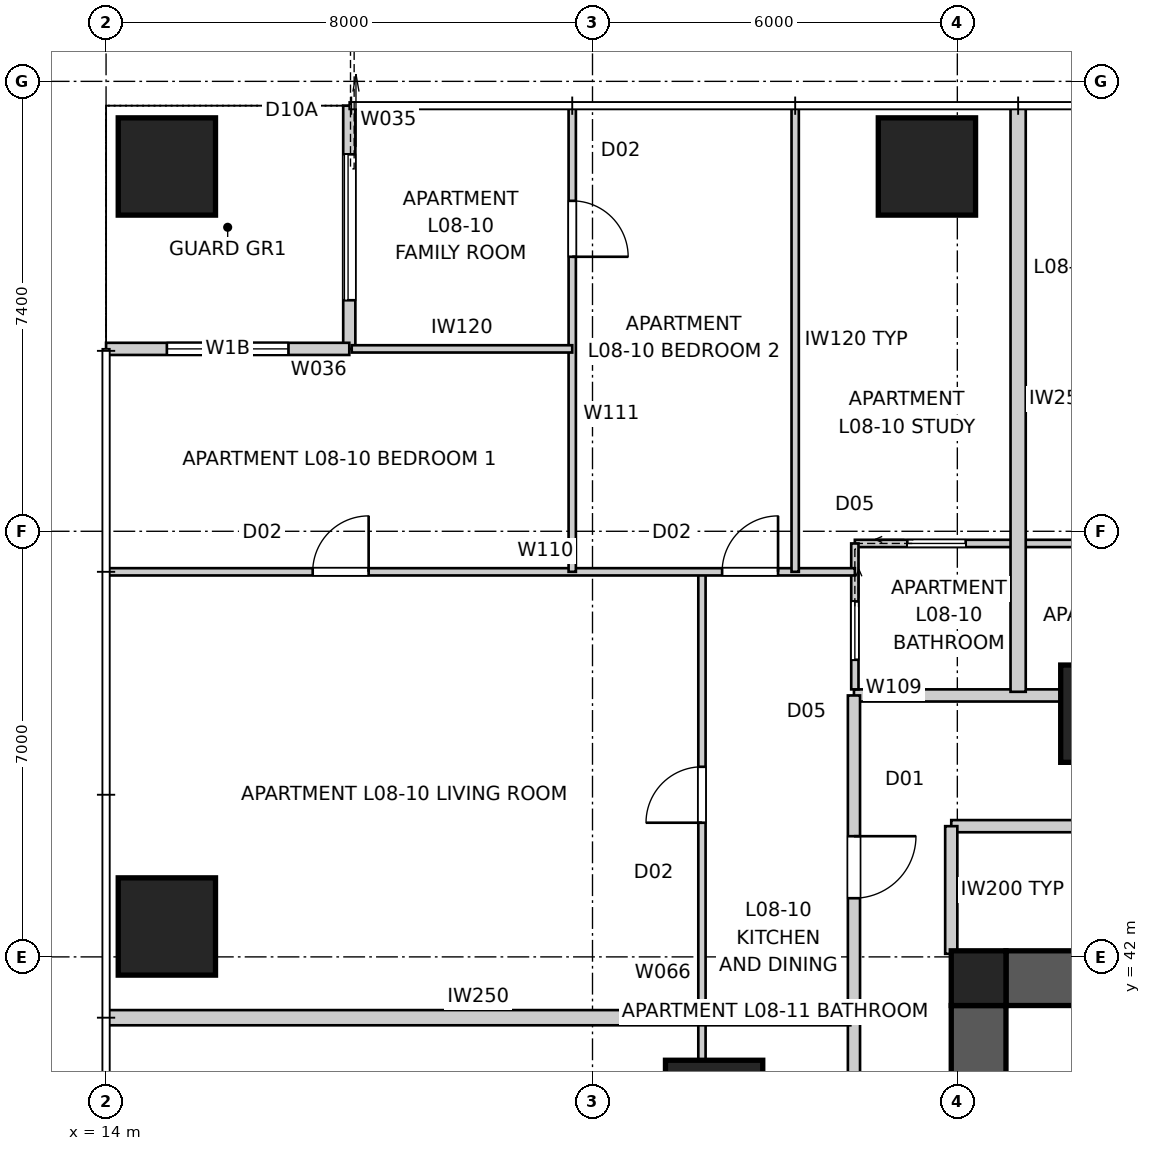
"""IFC4 building model, lengths in metres.
Left out: names, types, materials, properties, quantities, classifications, styles, units other than length and angle.
Written with IfcOpenShell. Run it as: python <this file> out.ifc"""

import sys

from ifc_helpers import new_model, si_unit, direction, frame, frame_2d, origin, origin_2d, place, context, subcontext, project, spatial, polyline, rectangle, outline, extrude, element, fill, save


model = new_model("IFC4")
c1 = context("Model", 3, precision=1e-05, world=origin(), true_north=direction((0.0, 1.0)))
c2 = subcontext(c1, "Body", "Model", "MODEL_VIEW")
j1 = project(units=[si_unit("LENGTHUNIT", "METRE"), si_unit("PLANEANGLEUNIT", "RADIAN")], contexts=[c1])
p1 = place(None, origin())
s1 = spatial("IfcSite", under=j1, at=p1, CompositionType="ELEMENT")
p2 = place(p1, origin())
s2 = spatial("IfcBuilding", under=s1, at=p2, CompositionType="ELEMENT")
p3 = place(p2, frame((0.0, 0.0, 32.0)))
s3 = spatial("IfcBuildingStorey", under=s2, at=p3, CompositionType="ELEMENT", Elevation=32.0)
p4 = place(p3, frame((28.8, 41.65, 0.0), z_axis=(0.0, 0.0, 1.0), x_axis=(1.0, 0.0, 0.0)))
e1 = element("IfcWall", 1, at=p4, inside=s3, PredefinedType="SHEAR", context=c2, shape_type="SweptSolid", body=[
    extrude(outline(polyline([(0.0, -0.45), (22.4, -0.45), (22.4, -0.025), (22.85, -0.025), (22.85, 0.025), (22.4, 0.025), (22.4, 0.45), (0.0, 0.45), (0.0, 0.025), (-0.45, 0.025), (-0.45, -0.025), (0.0, -0.025), (0.0, -0.45)])), origin(), (0.0, 0.0, 1.0), 3.4),
])
p5 = place(p3, frame((28.35, 41.2, 0.0), z_axis=(0.0, 0.0, 1.0), x_axis=(0.0, -1.0, 0.0)))
e2 = element("IfcWall", 2, at=p5, inside=s3, PredefinedType="SHEAR", context=c2, shape_type="SweptSolid", body=[
    extrude(outline(polyline([(0.0, -0.45), (22.4, -0.45), (22.4, -0.025), (22.85, -0.025), (22.85, 0.025), (22.4, 0.025), (22.4, 0.45), (0.0, 0.45), (0.0, 0.025), (-0.45, 0.025), (-0.45, -0.025), (0.0, -0.025), (0.0, -0.45)])), origin(), (0.0, 0.0, 1.0), 3.4),
])
p6 = place(p5, frame((11.14, 0.0, 0.0)))
e3 = element("IfcOpeningElement", 3, at=p6, cuts=e2, PredefinedType="OPENING", context=c2, shape_type="SweptSolid", body=[
    extrude(rectangle(XDim=1.02, YDim=2.4, at=frame_2d((0.51, 1.2))), frame((0.0, 0.46, 0.0), z_axis=(0.0, -1.0, 0.0), x_axis=(1.0, 0.0, 0.0)), (0.0, 0.0, 1.0), 0.92),
])
p7 = place(p3, frame((28.35, 41.65, 0.0), z_axis=(0.0, 0.0, 1.0), x_axis=(1.0, 0.0, 0.0)))
e4 = element("IfcColumn", 4, at=p7, inside=s3, PredefinedType="COLUMN", context=c2, shape_type="SweptSolid", body=[
    extrude(rectangle(XDim=0.9, YDim=0.9, at=origin_2d()), origin(), (0.0, 0.0, 1.0), 3.4),
])
for number, where, z_axis, x_axis in (
    (5, (27.5, 55.0, 0.0), (0.0, 0.0, 1.0), (1.0, 0.0, 0.0)),
    (6, (15.0, 55.0, 0.0), (0.0, 0.0, 1.0), (1.0, 0.0, 0.0)),
    (7, (15.0, 42.5, 0.0), (0.0, 0.0, 1.0), (1.0, 0.0, 0.0)),
    (8, (30.5, 46.0, 0.0), (0.0, 0.0, 1.0), (1.0, 0.0, 0.0)),
    (9, (24.0, 39.5, 0.0), (0.0, 0.0, 1.0), (1.0, 0.0, 0.0)),
):
    element("IfcColumn", number, at=place(p3, frame(where, z_axis=z_axis, x_axis=x_axis)), inside=s3, PredefinedType="COLUMN", context=c2, shape_type="SweptSolid", body=[
        extrude(rectangle(XDim=1.6, YDim=1.6, at=origin_2d()), origin(), (0.0, 0.0, 1.0), 3.4),
    ])
p8 = place(p3, frame((18.0, 56.0, 0.0), z_axis=(0.0, 0.0, 1.0), x_axis=(0.0, -1.0, 0.0)))
e10 = element("IfcWall", 10, at=p8, inside=s3, PredefinedType="SOLIDWALL", context=c2, shape_type="SweptSolid", body=[
    extrude(rectangle(XDim=4.0, YDim=0.2, at=frame_2d((2.0, 0.0))), origin(), (0.0, 0.0, 1.0), 3.25),
])
p9 = place(p8, frame((0.8, 0.0, 0.0)))
e11 = element("IfcOpeningElement", 11, at=p9, cuts=e10, PredefinedType="OPENING", context=c2, shape_type="SweptSolid", body=[
    extrude(rectangle(XDim=2.4, YDim=2.1, at=frame_2d((1.2, 1.05))), frame((0.0, 0.11, 0.0), z_axis=(0.0, -1.0, 0.0), x_axis=(1.0, 0.0, 0.0)), (0.0, 0.0, 1.0), 0.22),
])
p10 = place(p3, frame((18.0, 52.0, 0.0), z_axis=(0.0, 0.0, 1.0), x_axis=(-1.0, 0.0, 0.0)))
e12 = element("IfcWall", 12, at=p10, inside=s3, PredefinedType="SOLIDWALL", context=c2, shape_type="SweptSolid", body=[
    extrude(rectangle(XDim=4.0, YDim=0.2, at=frame_2d((2.0, 0.0))), origin(), (0.0, 0.0, 1.0), 3.25),
])
p11 = place(p10, frame((1.0, 0.0, 0.45)))
e13 = element("IfcOpeningElement", 13, at=p11, cuts=e12, PredefinedType="OPENING", context=c2, shape_type="SweptSolid", body=[
    extrude(rectangle(XDim=2.0, YDim=1.8, at=frame_2d((1.0, 0.9))), frame((0.0, 0.11, 0.0), z_axis=(0.0, -1.0, 0.0), x_axis=(1.0, 0.0, 0.0)), (0.0, 0.0, 1.0), 0.22),
])
p12 = place(p3, frame((30.758, 46.3, 0.0), z_axis=(0.0, 0.0, 1.0), x_axis=(-1.0, 0.0, 0.0)))
e14 = element("IfcWall", 14, at=p12, inside=s3, PredefinedType="PARTITIONING", context=c2, shape_type="SweptSolid", body=[
    extrude(rectangle(XDim=4.458, YDim=0.2, at=frame_2d((2.229, 0.0))), origin(), (0.0, 0.0, 1.0), 3.25),
])
p13 = place(p3, frame((26.3, 46.3, 0.0), z_axis=(0.0, 0.0, 1.0), x_axis=(0.0, -1.0, 0.0)))
e15 = element("IfcWall", 15, at=p13, inside=s3, PredefinedType="PARTITIONING", context=c2, shape_type="SweptSolid", body=[
    extrude(rectangle(XDim=32.6, YDim=0.2, at=frame_2d((16.3, 0.0))), origin(), (0.0, 0.0, 1.0), 3.25),
])
p14 = place(p13, frame((2.315, 0.0, 0.0)))
e16 = element("IfcOpeningElement", 16, at=p14, cuts=e15, PredefinedType="OPENING", context=c2, shape_type="SweptSolid", body=[
    extrude(rectangle(XDim=1.02, YDim=2.34, at=frame_2d((0.51, 1.17))), frame((0.0, 0.11, 0.0), z_axis=(0.0, -1.0, 0.0), x_axis=(1.0, 0.0, 0.0)), (0.0, 0.0, 1.0), 0.22),
])
p15 = place(p13, frame((10.624, 0.0, 0.0)))
e17 = element("IfcOpeningElement", 17, at=p15, cuts=e15, PredefinedType="OPENING", context=c2, shape_type="SweptSolid", body=[
    extrude(rectangle(XDim=1.02, YDim=2.34, at=frame_2d((0.51, 1.17))), frame((0.0, 0.11, 0.0), z_axis=(0.0, -1.0, 0.0), x_axis=(1.0, 0.0, 0.0)), (0.0, 0.0, 1.0), 0.22),
])
p16 = place(p13, frame((17.848, 0.0, 0.0)))
e18 = element("IfcOpeningElement", 18, at=p16, cuts=e15, PredefinedType="OPENING", context=c2, shape_type="SweptSolid", body=[
    extrude(rectangle(XDim=1.02, YDim=2.34, at=frame_2d((0.51, 1.17))), frame((0.0, 0.11, 0.0), z_axis=(0.0, -1.0, 0.0), x_axis=(1.0, 0.0, 0.0)), (0.0, 0.0, 1.0), 0.22),
])
p17 = place(p13, frame((30.516, 0.0, 0.0)))
e19 = element("IfcOpeningElement", 19, at=p17, cuts=e15, PredefinedType="OPENING", context=c2, shape_type="SweptSolid", body=[
    extrude(rectangle(XDim=1.02, YDim=2.34, at=frame_2d((0.51, 1.17))), frame((0.0, 0.11, 0.0), z_axis=(0.0, -1.0, 0.0), x_axis=(1.0, 0.0, 0.0)), (0.0, 0.0, 1.0), 0.22),
])
p18 = place(p3, frame((29.0, 56.0, 0.0), z_axis=(0.0, 0.0, 1.0), x_axis=(0.0, -1.0, 0.0)))
e20 = element("IfcWall", 20, at=p18, inside=s3, PredefinedType="PARTITIONING", context=c2, shape_type="SweptSolid", body=[
    extrude(rectangle(XDim=9.64, YDim=0.25, at=frame_2d((4.82, 0.0))), origin(), (0.0, 0.0, 1.0), 3.25),
])
p19 = place(p3, frame((14.0, 41.0, 0.0), z_axis=(0.0, 0.0, 1.0), x_axis=(1.0, 0.0, 0.0)))
e21 = element("IfcWall", 21, at=p19, inside=s3, PredefinedType="PARTITIONING", context=c2, shape_type="SweptSolid", body=[
    extrude(rectangle(XDim=12.24, YDim=0.25, at=frame_2d((6.12, 0.0))), origin(), (0.0, 0.0, 1.0), 3.25),
])
p20 = place(p3, frame((52.1, 44.15, 0.0), z_axis=(0.0, 0.0, 1.0), x_axis=(-1.0, 0.0, 0.0)))
e22 = element("IfcWall", 22, at=p20, inside=s3, PredefinedType="PARTITIONING", context=c2, shape_type="SweptSolid", body=[
    extrude(rectangle(XDim=24.2, YDim=0.2, at=frame_2d((12.1, 0.0))), origin(), (0.0, 0.0, 1.0), 3.25),
])
p21 = place(p20, frame((10.743, 0.0, 0.0)))
e23 = element("IfcOpeningElement", 23, at=p21, cuts=e22, PredefinedType="OPENING", context=c2, shape_type="SweptSolid", body=[
    extrude(rectangle(XDim=1.02, YDim=2.1, at=frame_2d((0.51, 1.05))), frame((0.0, 0.11, 0.0), z_axis=(0.0, -1.0, 0.0), x_axis=(1.0, 0.0, 0.0)), (0.0, 0.0, 1.0), 0.22),
])
p22 = place(p20, frame((19.636, 0.0, 0.0)))
e24 = element("IfcOpeningElement", 24, at=p22, cuts=e22, PredefinedType="OPENING", context=c2, shape_type="SweptSolid", body=[
    extrude(rectangle(XDim=1.02, YDim=2.1, at=frame_2d((0.51, 1.05))), frame((0.0, 0.11, 0.0), z_axis=(0.0, -1.0, 0.0), x_axis=(1.0, 0.0, 0.0)), (0.0, 0.0, 1.0), 0.22),
])
p23 = place(p20, frame((3.447, 0.0, 0.0)))
e25 = element("IfcOpeningElement", 25, at=p23, cuts=e22, PredefinedType="OPENING", context=c2, shape_type="SweptSolid", body=[
    extrude(rectangle(XDim=1.02, YDim=2.1, at=frame_2d((0.51, 1.05))), frame((0.0, 0.11, 0.0), z_axis=(0.0, -1.0, 0.0), x_axis=(1.0, 0.0, 0.0)), (0.0, 0.0, 1.0), 0.22),
])
p24 = place(p3, frame((27.9, 44.15, 0.0), z_axis=(0.0, 0.0, 1.0), x_axis=(0.0, -1.0, 0.0)))
e26 = element("IfcWall", 26, at=p24, inside=s3, PredefinedType="PARTITIONING", context=c2, shape_type="SweptSolid", body=[
    extrude(rectangle(XDim=2.1, YDim=0.2, at=frame_2d((1.05, 0.0))), origin(), (0.0, 0.0, 1.0), 3.25),
])
p25 = place(p3, frame((23.8, 11.2, 0.0), z_axis=(0.0, 0.0, 1.0), x_axis=(0.0, 1.0, 0.0)))
e27 = element("IfcWall", 27, at=p25, inside=s3, PredefinedType="PARTITIONING", context=c2, shape_type="SweptSolid", body=[
    extrude(rectangle(XDim=37.133, YDim=0.12, at=frame_2d((18.567, 0.0))), origin(), (0.0, 0.0, 1.0), 2.55),
])
p26 = place(p25, frame((33.007, 0.0, 0.0)))
e28 = element("IfcOpeningElement", 28, at=p26, cuts=e27, PredefinedType="OPENING", context=c2, shape_type="SweptSolid", body=[
    extrude(rectangle(XDim=0.92, YDim=2.34, at=frame_2d((0.46, 1.17))), frame((0.0, 0.07, 0.0), z_axis=(0.0, -1.0, 0.0), x_axis=(1.0, 0.0, 0.0)), (0.0, 0.0, 1.0), 0.14),
])
p27 = place(p25, frame((23.84, 0.0, 0.0)))
e29 = element("IfcOpeningElement", 29, at=p27, cuts=e27, PredefinedType="OPENING", context=c2, shape_type="SweptSolid", body=[
    extrude(rectangle(XDim=0.92, YDim=2.34, at=frame_2d((0.46, 1.17))), frame((0.0, 0.07, 0.0), z_axis=(0.0, -1.0, 0.0), x_axis=(1.0, 0.0, 0.0)), (0.0, 0.0, 1.0), 0.14),
])
p28 = place(p25, frame((16.482, 0.0, 0.0)))
e30 = element("IfcOpeningElement", 30, at=p28, cuts=e27, PredefinedType="OPENING", context=c2, shape_type="SweptSolid", body=[
    extrude(rectangle(XDim=0.92, YDim=2.34, at=frame_2d((0.46, 1.17))), frame((0.0, 0.07, 0.0), z_axis=(0.0, -1.0, 0.0), x_axis=(1.0, 0.0, 0.0)), (0.0, 0.0, 1.0), 0.14),
])
p29 = place(p25, frame((1.632, 0.0, 0.0)))
e31 = element("IfcOpeningElement", 31, at=p29, cuts=e27, PredefinedType="OPENING", context=c2, shape_type="SweptSolid", body=[
    extrude(rectangle(XDim=0.92, YDim=2.34, at=frame_2d((0.46, 1.17))), frame((0.0, 0.07, 0.0), z_axis=(0.0, -1.0, 0.0), x_axis=(1.0, 0.0, 0.0)), (0.0, 0.0, 1.0), 0.14),
])
p30 = place(p25, frame((19.704, 0.0, 0.0)))
e32 = element("IfcOpeningElement", 32, at=p30, cuts=e27, PredefinedType="OPENING", context=c2, shape_type="SweptSolid", body=[
    extrude(rectangle(XDim=0.96, YDim=2.1, at=frame_2d((0.48, 1.05))), frame((0.0, 0.07, 0.0), z_axis=(0.0, -1.0, 0.0), x_axis=(1.0, 0.0, 0.0)), (0.0, 0.0, 1.0), 0.14),
])
p31 = place(p25, frame((10.128, 0.0, 0.0)))
e33 = element("IfcOpeningElement", 33, at=p31, cuts=e27, PredefinedType="OPENING", context=c2, shape_type="SweptSolid", body=[
    extrude(rectangle(XDim=0.96, YDim=2.1, at=frame_2d((0.48, 1.05))), frame((0.0, 0.07, 0.0), z_axis=(0.0, -1.0, 0.0), x_axis=(1.0, 0.0, 0.0)), (0.0, 0.0, 1.0), 0.14),
])
p32 = place(p3, frame((26.315, 48.8, 0.0), z_axis=(0.0, 0.0, 1.0), x_axis=(1.0, 0.0, 0.0)))
e34 = element("IfcWall", 34, at=p32, inside=s3, PredefinedType="PARTITIONING", context=c2, shape_type="SweptSolid", body=[
    extrude(rectangle(XDim=27.41, YDim=0.12, at=frame_2d((13.705, 0.0))), origin(), (0.0, 0.0, 1.0), 3.25),
])
p33 = place(p32, frame((18.725, 0.0, 0.0)))
e35 = element("IfcOpeningElement", 35, at=p33, cuts=e34, PredefinedType="OPENING", context=c2, shape_type="SweptSolid", body=[
    extrude(rectangle(XDim=0.92, YDim=2.34, at=frame_2d((0.46, 1.17))), frame((0.0, 0.07, 0.0), z_axis=(0.0, -1.0, 0.0), x_axis=(1.0, 0.0, 0.0)), (0.0, 0.0, 1.0), 0.14),
])
p34 = place(p32, frame((22.367, 0.0, 0.0)))
e36 = element("IfcOpeningElement", 36, at=p34, cuts=e34, PredefinedType="OPENING", context=c2, shape_type="SweptSolid", body=[
    extrude(rectangle(XDim=0.92, YDim=2.34, at=frame_2d((0.46, 1.17))), frame((0.0, 0.07, 0.0), z_axis=(0.0, -1.0, 0.0), x_axis=(1.0, 0.0, 0.0)), (0.0, 0.0, 1.0), 0.14),
])
p35 = place(p32, frame((15.903, 0.0, 0.0)))
e37 = element("IfcOpeningElement", 37, at=p35, cuts=e34, PredefinedType="OPENING", context=c2, shape_type="SweptSolid", body=[
    extrude(rectangle(XDim=0.92, YDim=2.34, at=frame_2d((0.46, 1.17))), frame((0.0, 0.07, 0.0), z_axis=(0.0, -1.0, 0.0), x_axis=(1.0, 0.0, 0.0)), (0.0, 0.0, 1.0), 0.14),
])
p36 = place(p32, frame((25.567, 0.0, 0.0)))
e38 = element("IfcOpeningElement", 38, at=p36, cuts=e34, PredefinedType="OPENING", context=c2, shape_type="SweptSolid", body=[
    extrude(rectangle(XDim=0.96, YDim=2.1, at=frame_2d((0.48, 1.05))), frame((0.0, 0.07, 0.0), z_axis=(0.0, -1.0, 0.0), x_axis=(1.0, 0.0, 0.0)), (0.0, 0.0, 1.0), 0.14),
])
p37 = place(p32, frame((0.863, 0.0, 0.0)))
e39 = element("IfcOpeningElement", 39, at=p37, cuts=e34, PredefinedType="OPENING", context=c2, shape_type="SweptSolid", body=[
    extrude(rectangle(XDim=0.96, YDim=2.1, at=frame_2d((0.48, 1.05))), frame((0.0, 0.07, 0.0), z_axis=(0.0, -1.0, 0.0), x_axis=(1.0, 0.0, 0.0)), (0.0, 0.0, 1.0), 0.14),
])
p38 = place(p32, frame((7.503, 0.0, 0.0)))
e40 = element("IfcOpeningElement", 40, at=p38, cuts=e34, PredefinedType="OPENING", context=c2, shape_type="SweptSolid", body=[
    extrude(rectangle(XDim=0.96, YDim=2.1, at=frame_2d((0.48, 1.05))), frame((0.0, 0.07, 0.0), z_axis=(0.0, -1.0, 0.0), x_axis=(1.0, 0.0, 0.0)), (0.0, 0.0, 1.0), 0.14),
])
p39 = place(p3, frame((26.315, 48.8, 0.0), z_axis=(0.0, 0.0, 1.0), x_axis=(0.0, -1.0, 0.0)))
e41 = element("IfcWall", 41, at=p39, inside=s3, PredefinedType="PARTITIONING", context=c2, shape_type="SweptSolid", body=[
    extrude(rectangle(XDim=2.4, YDim=0.12, at=frame_2d((1.2, 0.0))), origin(), (0.0, 0.0, 1.0), 3.25),
])
p40 = place(p39, frame((0.953, 0.0, 0.0)))
e42 = element("IfcOpeningElement", 42, at=p40, cuts=e41, PredefinedType="OPENING", context=c2, shape_type="SweptSolid", body=[
    extrude(rectangle(XDim=0.96, YDim=2.1, at=frame_2d((0.48, 1.05))), frame((0.0, 0.07, 0.0), z_axis=(0.0, -1.0, 0.0), x_axis=(1.0, 0.0, 0.0)), (0.0, 0.0, 1.0), 0.14),
])
p41 = place(p3, frame((14.04, 48.333, 0.0), z_axis=(0.0, 0.0, 1.0), x_axis=(1.0, 0.0, 0.0)))
e43 = element("IfcWall", 43, at=p41, inside=s3, PredefinedType="PARTITIONING", context=c2, shape_type="SweptSolid", body=[
    extrude(rectangle(XDim=12.275, YDim=0.12, at=frame_2d((6.137, 0.0))), origin(), (0.0, 0.0, 1.0), 3.25),
])
p42 = place(p41, frame((10.092, 0.0, 0.0)))
e44 = element("IfcOpeningElement", 44, at=p42, cuts=e43, PredefinedType="OPENING", context=c2, shape_type="SweptSolid", body=[
    extrude(rectangle(XDim=0.92, YDim=2.34, at=frame_2d((0.46, 1.17))), frame((0.0, 0.07, 0.0), z_axis=(0.0, -1.0, 0.0), x_axis=(1.0, 0.0, 0.0)), (0.0, 0.0, 1.0), 0.14),
])
p43 = place(p41, frame((3.358, 0.0, 0.0)))
e45 = element("IfcOpeningElement", 45, at=p43, cuts=e43, PredefinedType="OPENING", context=c2, shape_type="SweptSolid", body=[
    extrude(rectangle(XDim=0.92, YDim=2.34, at=frame_2d((0.46, 1.17))), frame((0.0, 0.07, 0.0), z_axis=(0.0, -1.0, 0.0), x_axis=(1.0, 0.0, 0.0)), (0.0, 0.0, 1.0), 0.14),
])
p44 = place(p3, frame((21.667, 55.96, 0.0), z_axis=(0.0, 0.0, 1.0), x_axis=(0.0, -1.0, 0.0)))
e46 = element("IfcWall", 46, at=p44, inside=s3, PredefinedType="PARTITIONING", context=c2, shape_type="SweptSolid", body=[
    extrude(rectangle(XDim=7.627, YDim=0.12, at=frame_2d((3.813, 0.0))), origin(), (0.0, 0.0, 1.0), 3.25),
])
p45 = place(p44, frame((1.525, 0.0, 0.0)))
e47 = element("IfcOpeningElement", 47, at=p45, cuts=e46, PredefinedType="OPENING", context=c2, shape_type="SweptSolid", body=[
    extrude(rectangle(XDim=0.92, YDim=2.34, at=frame_2d((0.46, 1.17))), frame((0.0, 0.07, 0.0), z_axis=(0.0, -1.0, 0.0), x_axis=(1.0, 0.0, 0.0)), (0.0, 0.0, 1.0), 0.14),
])
p46 = place(p3, frame((18.04, 52.0, 0.0), z_axis=(0.0, 0.0, 1.0), x_axis=(1.0, 0.0, 0.0)))
e48 = element("IfcWall", 48, at=p46, inside=s3, PredefinedType="PARTITIONING", context=c2, shape_type="SweptSolid", body=[
    extrude(rectangle(XDim=3.627, YDim=0.12, at=frame_2d((1.813, 0.0))), origin(), (0.0, 0.0, 1.0), 3.25),
])
p47 = place(p3, frame((25.333, 55.96, 0.0), z_axis=(0.0, 0.0, 1.0), x_axis=(0.0, -1.0, 0.0)))
e49 = element("IfcWall", 49, at=p47, inside=s3, PredefinedType="PARTITIONING", context=c2, shape_type="SweptSolid", body=[
    extrude(rectangle(XDim=7.627, YDim=0.12, at=frame_2d((3.813, 0.0))), origin(), (0.0, 0.0, 1.0), 2.638),
])
p48 = place(p9, origin())
e50 = element("IfcDoor", 50, at=p48, inside=s3, OperationType="SLIDING_TO_LEFT", PredefinedType="DOOR", context=c2, shape_type="SweptSolid", body=[
    extrude(rectangle(XDim=2.4, YDim=2.1, at=frame_2d((1.2, 1.05))), frame((0.0, 0.025, 0.0), z_axis=(0.0, -1.0, 0.0), x_axis=(1.0, 0.0, 0.0)), (0.0, 0.0, 1.0), 0.05),
])
fill(e11, e50)
p49 = place(p11, origin())
e51 = element("IfcWindow", 51, at=p49, inside=s3, PartitioningType="SINGLE_PANEL", PredefinedType="WINDOW", context=c2, shape_type="SweptSolid", body=[
    extrude(rectangle(XDim=2.0, YDim=1.8, at=frame_2d((1.0, 0.9))), frame((0.0, 0.03, 0.0), z_axis=(0.0, -1.0, 0.0), x_axis=(1.0, 0.0, 0.0)), (0.0, 0.0, 1.0), 0.06),
])
fill(e13, e51)
p50 = place(p14, origin())
e52 = element("IfcDoor", 52, at=p50, inside=s3, OperationType="SINGLE_SWING_LEFT", PredefinedType="DOOR", context=c2, shape_type="SweptSolid", body=[
    extrude(rectangle(XDim=1.02, YDim=2.34, at=frame_2d((0.51, 1.17))), frame((0.0, 0.025, 0.0), z_axis=(0.0, -1.0, 0.0), x_axis=(1.0, 0.0, 0.0)), (0.0, 0.0, 1.0), 0.05),
])
fill(e16, e52)
p51 = place(p26, origin())
e53 = element("IfcDoor", 53, at=p51, inside=s3, OperationType="SINGLE_SWING_LEFT", PredefinedType="DOOR", context=c2, shape_type="SweptSolid", body=[
    extrude(rectangle(XDim=0.92, YDim=2.34, at=frame_2d((0.46, 1.17))), frame((0.0, 0.025, 0.0), z_axis=(0.0, -1.0, 0.0), x_axis=(1.0, 0.0, 0.0)), (0.0, 0.0, 1.0), 0.05),
])
fill(e28, e53)
p52 = place(p40, origin())
e54 = element("IfcDoor", 54, at=p52, inside=s3, OperationType="SLIDING_TO_LEFT", PredefinedType="DOOR", context=c2, shape_type="SweptSolid", body=[
    extrude(rectangle(XDim=0.96, YDim=2.1, at=frame_2d((0.48, 1.05))), frame((0.0, 0.025, 0.0), z_axis=(0.0, -1.0, 0.0), x_axis=(1.0, 0.0, 0.0)), (0.0, 0.0, 1.0), 0.05),
])
fill(e42, e54)
p53 = place(p42, origin())
e55 = element("IfcDoor", 55, at=p53, inside=s3, OperationType="SINGLE_SWING_RIGHT", PredefinedType="DOOR", context=c2, shape_type="SweptSolid", body=[
    extrude(rectangle(XDim=0.92, YDim=2.34, at=frame_2d((0.46, 1.17))), frame((0.0, 0.025, 0.0), z_axis=(0.0, -1.0, 0.0), x_axis=(1.0, 0.0, 0.0)), (0.0, 0.0, 1.0), 0.05),
])
fill(e44, e55)
p54 = place(p43, origin())
e56 = element("IfcDoor", 56, at=p54, inside=s3, OperationType="SINGLE_SWING_RIGHT", PredefinedType="DOOR", context=c2, shape_type="SweptSolid", body=[
    extrude(rectangle(XDim=0.92, YDim=2.34, at=frame_2d((0.46, 1.17))), frame((0.0, 0.025, 0.0), z_axis=(0.0, -1.0, 0.0), x_axis=(1.0, 0.0, 0.0)), (0.0, 0.0, 1.0), 0.05),
])
fill(e45, e56)
p55 = place(p37, origin())
e57 = element("IfcDoor", 57, at=p55, inside=s3, OperationType="SLIDING_TO_LEFT", PredefinedType="DOOR", context=c2, shape_type="SweptSolid", body=[
    extrude(rectangle(XDim=0.96, YDim=2.1, at=frame_2d((0.48, 1.05))), frame((0.0, 0.025, 0.0), z_axis=(0.0, -1.0, 0.0), x_axis=(1.0, 0.0, 0.0)), (0.0, 0.0, 1.0), 0.05),
])
fill(e39, e57)
p56 = place(p45, origin())
e58 = element("IfcDoor", 58, at=p56, inside=s3, OperationType="SINGLE_SWING_RIGHT", PredefinedType="DOOR", context=c2, shape_type="SweptSolid", body=[
    extrude(rectangle(XDim=0.92, YDim=2.34, at=frame_2d((0.46, 1.17))), frame((0.0, 0.025, 0.0), z_axis=(0.0, -1.0, 0.0), x_axis=(1.0, 0.0, 0.0)), (0.0, 0.0, 1.0), 0.05),
])
fill(e47, e58)
save(model, sys.argv[1])
